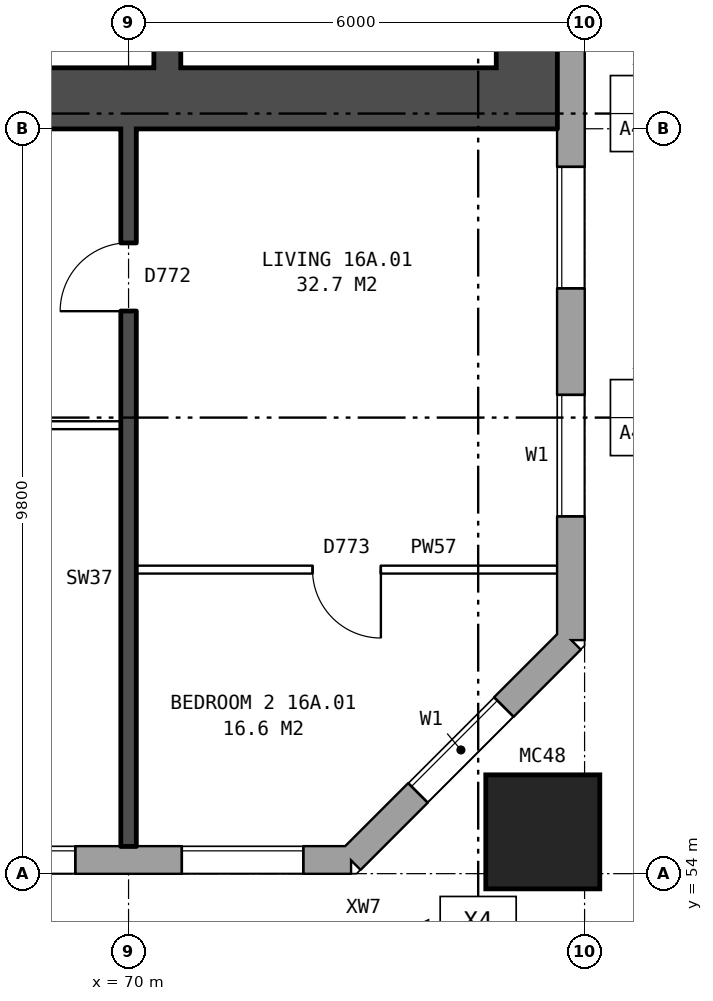
"""IFC4 building model, lengths in metres.
Left out: names, types, materials, properties, quantities, classifications, styles, units other than length and angle.
Written with IfcOpenShell. Run it as: python <this file> out.ifc"""

import sys

from ifc_helpers import new_model, si_unit, direction, frame, frame_2d, origin, origin_2d, place, context, subcontext, project, spatial, rectangle, hollow_rectangle, extrude, element, fill, save


model = new_model("IFC4")
c1 = context("Model", 3, precision=1e-05, world=origin(), true_north=direction((0.0, 1.0)))
c2 = subcontext(c1, "Body", "Model", "MODEL_VIEW")
j1 = project(units=[si_unit("LENGTHUNIT", "METRE"), si_unit("PLANEANGLEUNIT", "RADIAN")], contexts=[c1])
p1 = place(None, origin())
s1 = spatial("IfcSite", under=j1, at=p1, CompositionType="ELEMENT")
p2 = place(p1, origin())
s2 = spatial("IfcBuilding", under=s1, at=p2, CompositionType="ELEMENT")
p3 = place(p2, frame((0.0, 0.0, 59.8)))
s3 = spatial("IfcBuildingStorey", under=s2, at=p3, CompositionType="ELEMENT", Elevation=59.8)
p4 = place(p3, frame((75.45, 54.55, 0.0), z_axis=(0.0, 0.0, 1.0), x_axis=(1.0, 0.0, 0.0)))
e1 = element("IfcColumn", 1, at=p4, inside=s3, PredefinedType="COLUMN", context=c2, shape_type="SweptSolid", body=[
    extrude(hollow_rectangle(XDim=1.5, YDim=1.5, WallThickness=0.08, at=origin_2d()), origin(), (0.0, 0.0, 1.0), 3.1),
])
p5 = place(p3, frame((24.575, 54.18, 0.0), z_axis=(0.0, 0.0, 1.0), x_axis=(1.0, 0.0, 0.0)))
e2 = element("IfcWall", 2, at=p5, inside=s3, PredefinedType="STANDARD", context=c2, shape_type="SweptSolid", body=[
    extrude(rectangle(XDim=48.351, YDim=0.36, at=frame_2d((24.175, 0.0))), origin(), (0.0, 0.0, 1.0), 2.85),
])
p6 = place(p5, frame((1.125, 0.0, 0.8)))
e3 = element("IfcOpeningElement", 3, at=p6, cuts=e2, PredefinedType="OPENING", context=c2, shape_type="SweptSolid", body=[
    extrude(rectangle(XDim=1.6, YDim=1.8, at=frame_2d((0.8, 0.9))), frame((0.0, 0.19, 0.0), z_axis=(0.0, -1.0, 0.0), x_axis=(1.0, 0.0, 0.0)), (0.0, 0.0, 1.0), 0.38),
])
p7 = place(p5, frame((4.125, 0.0, 0.8)))
e4 = element("IfcOpeningElement", 4, at=p7, cuts=e2, PredefinedType="OPENING", context=c2, shape_type="SweptSolid", body=[
    extrude(rectangle(XDim=1.6, YDim=1.8, at=frame_2d((0.8, 0.9))), frame((0.0, 0.19, 0.0), z_axis=(0.0, -1.0, 0.0), x_axis=(1.0, 0.0, 0.0)), (0.0, 0.0, 1.0), 0.38),
])
p8 = place(p5, frame((7.125, 0.0, 0.8)))
e5 = element("IfcOpeningElement", 5, at=p8, cuts=e2, PredefinedType="OPENING", context=c2, shape_type="SweptSolid", body=[
    extrude(rectangle(XDim=1.6, YDim=1.8, at=frame_2d((0.8, 0.9))), frame((0.0, 0.19, 0.0), z_axis=(0.0, -1.0, 0.0), x_axis=(1.0, 0.0, 0.0)), (0.0, 0.0, 1.0), 0.38),
])
p9 = place(p5, frame((10.125, 0.0, 0.8)))
e6 = element("IfcOpeningElement", 6, at=p9, cuts=e2, PredefinedType="OPENING", context=c2, shape_type="SweptSolid", body=[
    extrude(rectangle(XDim=1.6, YDim=1.8, at=frame_2d((0.8, 0.9))), frame((0.0, 0.19, 0.0), z_axis=(0.0, -1.0, 0.0), x_axis=(1.0, 0.0, 0.0)), (0.0, 0.0, 1.0), 0.38),
])
p10 = place(p5, frame((13.125, 0.0, 0.8)))
e7 = element("IfcOpeningElement", 7, at=p10, cuts=e2, PredefinedType="OPENING", context=c2, shape_type="SweptSolid", body=[
    extrude(rectangle(XDim=1.6, YDim=1.8, at=frame_2d((0.8, 0.9))), frame((0.0, 0.19, 0.0), z_axis=(0.0, -1.0, 0.0), x_axis=(1.0, 0.0, 0.0)), (0.0, 0.0, 1.0), 0.38),
])
p11 = place(p5, frame((16.125, 0.0, 0.8)))
e8 = element("IfcOpeningElement", 8, at=p11, cuts=e2, PredefinedType="OPENING", context=c2, shape_type="SweptSolid", body=[
    extrude(rectangle(XDim=1.6, YDim=1.8, at=frame_2d((0.8, 0.9))), frame((0.0, 0.19, 0.0), z_axis=(0.0, -1.0, 0.0), x_axis=(1.0, 0.0, 0.0)), (0.0, 0.0, 1.0), 0.38),
])
p12 = place(p5, frame((19.125, 0.0, 0.8)))
e9 = element("IfcOpeningElement", 9, at=p12, cuts=e2, PredefinedType="OPENING", context=c2, shape_type="SweptSolid", body=[
    extrude(rectangle(XDim=1.6, YDim=1.8, at=frame_2d((0.8, 0.9))), frame((0.0, 0.19, 0.0), z_axis=(0.0, -1.0, 0.0), x_axis=(1.0, 0.0, 0.0)), (0.0, 0.0, 1.0), 0.38),
])
p13 = place(p5, frame((22.425, 0.0, 0.15)))
e10 = element("IfcOpeningElement", 10, at=p13, cuts=e2, PredefinedType="OPENING", context=c2, shape_type="SweptSolid", body=[
    extrude(rectangle(XDim=0.6, YDim=0.9, at=frame_2d((0.3, 0.45))), frame((0.0, 0.19, 0.0), z_axis=(0.0, -1.0, 0.0), x_axis=(1.0, 0.0, 0.0)), (0.0, 0.0, 1.0), 0.38),
])
p14 = place(p5, frame((24.575, 0.0, 0.25)))
e11 = element("IfcOpeningElement", 11, at=p14, cuts=e2, PredefinedType="OPENING", context=c2, shape_type="SweptSolid", body=[
    extrude(rectangle(XDim=1.2, YDim=0.9, at=frame_2d((0.6, 0.45))), frame((0.0, 0.19, 0.0), z_axis=(0.0, -1.0, 0.0), x_axis=(1.0, 0.0, 0.0)), (0.0, 0.0, 1.0), 0.38),
])
p15 = place(p5, frame((28.125, 0.0, 0.8)))
e12 = element("IfcOpeningElement", 12, at=p15, cuts=e2, PredefinedType="OPENING", context=c2, shape_type="SweptSolid", body=[
    extrude(rectangle(XDim=1.6, YDim=1.8, at=frame_2d((0.8, 0.9))), frame((0.0, 0.19, 0.0), z_axis=(0.0, -1.0, 0.0), x_axis=(1.0, 0.0, 0.0)), (0.0, 0.0, 1.0), 0.38),
])
p16 = place(p5, frame((31.125, 0.0, 0.8)))
e13 = element("IfcOpeningElement", 13, at=p16, cuts=e2, PredefinedType="OPENING", context=c2, shape_type="SweptSolid", body=[
    extrude(rectangle(XDim=1.6, YDim=1.8, at=frame_2d((0.8, 0.9))), frame((0.0, 0.19, 0.0), z_axis=(0.0, -1.0, 0.0), x_axis=(1.0, 0.0, 0.0)), (0.0, 0.0, 1.0), 0.38),
])
p17 = place(p5, frame((34.125, 0.0, 0.8)))
e14 = element("IfcOpeningElement", 14, at=p17, cuts=e2, PredefinedType="OPENING", context=c2, shape_type="SweptSolid", body=[
    extrude(rectangle(XDim=1.6, YDim=1.8, at=frame_2d((0.8, 0.9))), frame((0.0, 0.19, 0.0), z_axis=(0.0, -1.0, 0.0), x_axis=(1.0, 0.0, 0.0)), (0.0, 0.0, 1.0), 0.38),
])
p18 = place(p5, frame((37.125, 0.0, 0.8)))
e15 = element("IfcOpeningElement", 15, at=p18, cuts=e2, PredefinedType="OPENING", context=c2, shape_type="SweptSolid", body=[
    extrude(rectangle(XDim=1.6, YDim=1.8, at=frame_2d((0.8, 0.9))), frame((0.0, 0.19, 0.0), z_axis=(0.0, -1.0, 0.0), x_axis=(1.0, 0.0, 0.0)), (0.0, 0.0, 1.0), 0.38),
])
p19 = place(p5, frame((40.125, 0.0, 0.8)))
e16 = element("IfcOpeningElement", 16, at=p19, cuts=e2, PredefinedType="OPENING", context=c2, shape_type="SweptSolid", body=[
    extrude(rectangle(XDim=1.6, YDim=1.8, at=frame_2d((0.8, 0.9))), frame((0.0, 0.19, 0.0), z_axis=(0.0, -1.0, 0.0), x_axis=(1.0, 0.0, 0.0)), (0.0, 0.0, 1.0), 0.38),
])
p20 = place(p5, frame((43.125, 0.0, 0.8)))
e17 = element("IfcOpeningElement", 17, at=p20, cuts=e2, PredefinedType="OPENING", context=c2, shape_type="SweptSolid", body=[
    extrude(rectangle(XDim=1.6, YDim=1.8, at=frame_2d((0.8, 0.9))), frame((0.0, 0.19, 0.0), z_axis=(0.0, -1.0, 0.0), x_axis=(1.0, 0.0, 0.0)), (0.0, 0.0, 1.0), 0.38),
])
p21 = place(p5, frame((46.125, 0.0, 0.8)))
e18 = element("IfcOpeningElement", 18, at=p21, cuts=e2, PredefinedType="OPENING", context=c2, shape_type="SweptSolid", body=[
    extrude(rectangle(XDim=1.6, YDim=1.8, at=frame_2d((0.8, 0.9))), frame((0.0, 0.19, 0.0), z_axis=(0.0, -1.0, 0.0), x_axis=(1.0, 0.0, 0.0)), (0.0, 0.0, 1.0), 0.38),
])
p22 = place(p5, frame((23.325, 0.0, 0.15)))
e19 = element("IfcOpeningElement", 19, at=p22, cuts=e2, PredefinedType="OPENING", context=c2, shape_type="SweptSolid", body=[
    extrude(rectangle(XDim=0.8, YDim=1.5, at=frame_2d((0.4, 0.75))), frame((0.0, 0.19, 0.0), z_axis=(0.0, -1.0, 0.0), x_axis=(1.0, 0.0, 0.0)), (0.0, 0.0, 1.0), 0.38),
])
p23 = place(p5, frame((26.425, 0.0, 1.65)))
e20 = element("IfcOpeningElement", 20, at=p23, cuts=e2, PredefinedType="OPENING", context=c2, shape_type="SweptSolid", body=[
    extrude(rectangle(XDim=0.8, YDim=0.9, at=frame_2d((0.4, 0.45))), frame((0.0, 0.19, 0.0), z_axis=(0.0, -1.0, 0.0), x_axis=(1.0, 0.0, 0.0)), (0.0, 0.0, 1.0), 0.38),
])
p24 = place(p3, frame((72.925, 54.18, 0.0), z_axis=(0.0, 0.0, 1.0), x_axis=(0.707106781187, 0.707106781187, 0.0)))
e21 = element("IfcWall", 21, at=p24, inside=s3, PredefinedType="STANDARD", context=c2, shape_type="SweptSolid", body=[
    extrude(rectangle(XDim=4.094, YDim=0.36, at=frame_2d((2.047, 0.0))), origin(), (0.0, 0.0, 1.0), 2.85),
])
p25 = place(p24, frame((1.247, 0.0, 0.8)))
e22 = element("IfcOpeningElement", 22, at=p25, cuts=e21, PredefinedType="OPENING", context=c2, shape_type="SweptSolid", body=[
    extrude(rectangle(XDim=1.6, YDim=1.8, at=frame_2d((0.8, 0.9))), frame((0.0, 0.19, 0.0), z_axis=(0.0, -1.0, 0.0), x_axis=(1.0, 0.0, 0.0)), (0.0, 0.0, 1.0), 0.38),
])
p26 = place(p3, frame((75.82, 57.075, 0.0), z_axis=(0.0, 0.0, 1.0), x_axis=(0.0, 1.0, 0.0)))
e23 = element("IfcWall", 23, at=p26, inside=s3, PredefinedType="STANDARD", context=c2, shape_type="SweptSolid", body=[
    extrude(rectangle(XDim=25.851, YDim=0.36, at=frame_2d((12.925, 0.0))), origin(), (0.0, 0.0, 1.0), 2.85),
])
p27 = place(p26, frame((1.625, 0.0, 0.8)))
e24 = element("IfcOpeningElement", 24, at=p27, cuts=e23, PredefinedType="OPENING", context=c2, shape_type="SweptSolid", body=[
    extrude(rectangle(XDim=1.6, YDim=1.8, at=frame_2d((0.8, 0.9))), frame((0.0, 0.19, 0.0), z_axis=(0.0, -1.0, 0.0), x_axis=(1.0, 0.0, 0.0)), (0.0, 0.0, 1.0), 0.38),
])
p28 = place(p26, frame((4.625, 0.0, 0.8)))
e25 = element("IfcOpeningElement", 25, at=p28, cuts=e23, PredefinedType="OPENING", context=c2, shape_type="SweptSolid", body=[
    extrude(rectangle(XDim=1.6, YDim=1.8, at=frame_2d((0.8, 0.9))), frame((0.0, 0.19, 0.0), z_axis=(0.0, -1.0, 0.0), x_axis=(1.0, 0.0, 0.0)), (0.0, 0.0, 1.0), 0.38),
])
p29 = place(p26, frame((19.625, 0.0, 0.8)))
e26 = element("IfcOpeningElement", 26, at=p29, cuts=e23, PredefinedType="OPENING", context=c2, shape_type="SweptSolid", body=[
    extrude(rectangle(XDim=1.6, YDim=1.8, at=frame_2d((0.8, 0.9))), frame((0.0, 0.19, 0.0), z_axis=(0.0, -1.0, 0.0), x_axis=(1.0, 0.0, 0.0)), (0.0, 0.0, 1.0), 0.38),
])
p30 = place(p26, frame((22.625, 0.0, 0.8)))
e27 = element("IfcOpeningElement", 27, at=p30, cuts=e23, PredefinedType="OPENING", context=c2, shape_type="SweptSolid", body=[
    extrude(rectangle(XDim=1.6, YDim=1.8, at=frame_2d((0.8, 0.9))), frame((0.0, 0.19, 0.0), z_axis=(0.0, -1.0, 0.0), x_axis=(1.0, 0.0, 0.0)), (0.0, 0.0, 1.0), 0.38),
])
p31 = place(p3, frame((75.24, 64.6, 0.0), z_axis=(0.0, 0.0, 1.0), x_axis=(0.0, 1.0, 0.0)))
e28 = element("IfcWall", 28, at=p31, inside=s3, PredefinedType="SHEAR", context=c2, shape_type="SweptSolid", body=[
    extrude(rectangle(XDim=10.8, YDim=0.8, at=frame_2d((5.4, 0.0))), origin(), (0.0, 0.0, 1.0), 2.85),
])
p32 = place(p3, frame((66.64, 64.2, 0.0), z_axis=(0.0, 0.0, 1.0), x_axis=(1.0, 0.0, 0.0)))
e29 = element("IfcWall", 29, at=p32, inside=s3, PredefinedType="SHEAR", context=c2, shape_type="SweptSolid", body=[
    extrude(rectangle(XDim=9.0, YDim=0.8, at=frame_2d((4.5, 0.0))), origin(), (0.0, 0.0, 1.0), 2.85),
])
p33 = place(p3, frame((70.51, 64.6, 0.0), z_axis=(0.0, 0.0, 1.0), x_axis=(0.0, 1.0, 0.0)))
e30 = element("IfcWall", 30, at=p33, inside=s3, PredefinedType="SHEAR", context=c2, shape_type="SweptSolid", body=[
    extrude(rectangle(XDim=2.075, YDim=0.35, at=frame_2d((1.038, 0.0))), origin(), (0.0, 0.0, 1.0), 2.85),
])
p34 = place(p3, frame((70.1, 58.0, 0.0), z_axis=(0.0, 0.0, 1.0), x_axis=(1.0, 0.0, 0.0)))
e31 = element("IfcWall", 31, at=p34, inside=s3, PredefinedType="PARTITIONING", context=c2, shape_type="SweptSolid", body=[
    extrude(rectangle(XDim=5.54, YDim=0.1, at=frame_2d((2.77, 0.0))), origin(), (0.0, 0.0, 1.0), 2.85),
])
p35 = place(p34, frame((2.32, 0.0, 0.0)))
e32 = element("IfcOpeningElement", 32, at=p35, cuts=e31, PredefinedType="OPENING", context=c2, shape_type="SweptSolid", body=[
    extrude(rectangle(XDim=0.9, YDim=2.1, at=frame_2d((0.45, 1.05))), frame((0.0, 0.06, 0.0), z_axis=(0.0, -1.0, 0.0), x_axis=(1.0, 0.0, 0.0)), (0.0, 0.0, 1.0), 0.12),
])
p36 = place(p3, frame((64.1, 59.9, 0.0), z_axis=(0.0, 0.0, 1.0), x_axis=(1.0, 0.0, 0.0)))
e33 = element("IfcWall", 33, at=p36, inside=s3, PredefinedType="PARTITIONING", context=c2, shape_type="SweptSolid", body=[
    extrude(rectangle(XDim=5.8, YDim=0.1, at=frame_2d((2.9, 0.0))), origin(), (0.0, 0.0, 1.0), 2.85),
])
p37 = place(p36, frame((3.6, 0.0, 0.0)))
e34 = element("IfcOpeningElement", 34, at=p37, cuts=e33, PredefinedType="OPENING", context=c2, shape_type="SweptSolid", body=[
    extrude(rectangle(XDim=0.9, YDim=2.1, at=frame_2d((0.45, 1.05))), frame((0.0, 0.06, 0.0), z_axis=(0.0, -1.0, 0.0), x_axis=(1.0, 0.0, 0.0)), (0.0, 0.0, 1.0), 0.12),
])
p38 = place(p36, frame((0.7, 0.0, 0.0)))
e35 = element("IfcOpeningElement", 35, at=p38, cuts=e33, PredefinedType="OPENING", context=c2, shape_type="SweptSolid", body=[
    extrude(rectangle(XDim=0.9, YDim=2.1, at=frame_2d((0.45, 1.05))), frame((0.0, 0.06, 0.0), z_axis=(0.0, -1.0, 0.0), x_axis=(1.0, 0.0, 0.0)), (0.0, 0.0, 1.0), 0.12),
])
p39 = place(p3, frame((70.0, 54.36, 0.0), z_axis=(0.0, 0.0, 1.0), x_axis=(0.0, 1.0, 0.0)))
e36 = element("IfcWall", 36, at=p39, inside=s3, PredefinedType="SOLIDWALL", context=c2, shape_type="SweptSolid", body=[
    extrude(rectangle(XDim=9.44, YDim=0.2, at=frame_2d((4.72, 0.0))), origin(), (0.0, 0.0, 1.0), 2.85),
])
p40 = place(p39, frame((7.04, 0.0, 0.0)))
e37 = element("IfcOpeningElement", 37, at=p40, cuts=e36, PredefinedType="OPENING", context=c2, shape_type="SweptSolid", body=[
    extrude(rectangle(XDim=0.9, YDim=2.1, at=frame_2d((0.45, 1.05))), frame((0.0, 0.11, 0.0), z_axis=(0.0, -1.0, 0.0), x_axis=(1.0, 0.0, 0.0)), (0.0, 0.0, 1.0), 0.22),
])
p41 = place(p20, origin())
e38 = element("IfcWindow", 38, at=p41, inside=s3, PartitioningType="SINGLE_PANEL", PredefinedType="WINDOW", context=c2, shape_type="SweptSolid", body=[
    extrude(rectangle(XDim=1.6, YDim=1.8, at=frame_2d((0.8, 0.9))), frame((0.0, 0.15, 0.0), z_axis=(0.0, -1.0, 0.0), x_axis=(1.0, 0.0, 0.0)), (0.0, 0.0, 1.0), 0.06),
])
fill(e17, e38)
p42 = place(p21, origin())
e39 = element("IfcWindow", 39, at=p42, inside=s3, PartitioningType="SINGLE_PANEL", PredefinedType="WINDOW", context=c2, shape_type="SweptSolid", body=[
    extrude(rectangle(XDim=1.6, YDim=1.8, at=frame_2d((0.8, 0.9))), frame((0.0, 0.15, 0.0), z_axis=(0.0, -1.0, 0.0), x_axis=(1.0, 0.0, 0.0)), (0.0, 0.0, 1.0), 0.06),
])
fill(e18, e39)
p43 = place(p25, origin())
e40 = element("IfcWindow", 40, at=p43, inside=s3, PartitioningType="SINGLE_PANEL", PredefinedType="WINDOW", context=c2, shape_type="SweptSolid", body=[
    extrude(rectangle(XDim=1.6, YDim=1.8, at=frame_2d((0.8, 0.9))), frame((0.0, 0.15, 0.0), z_axis=(0.0, -1.0, 0.0), x_axis=(1.0, 0.0, 0.0)), (0.0, 0.0, 1.0), 0.06),
])
fill(e22, e40)
p44 = place(p27, origin())
e41 = element("IfcWindow", 41, at=p44, inside=s3, PartitioningType="SINGLE_PANEL", PredefinedType="WINDOW", context=c2, shape_type="SweptSolid", body=[
    extrude(rectangle(XDim=1.6, YDim=1.8, at=frame_2d((0.8, 0.9))), frame((0.0, 0.15, 0.0), z_axis=(0.0, -1.0, 0.0), x_axis=(1.0, 0.0, 0.0)), (0.0, 0.0, 1.0), 0.06),
])
fill(e24, e41)
p45 = place(p28, origin())
e42 = element("IfcWindow", 42, at=p45, inside=s3, PartitioningType="SINGLE_PANEL", PredefinedType="WINDOW", context=c2, shape_type="SweptSolid", body=[
    extrude(rectangle(XDim=1.6, YDim=1.8, at=frame_2d((0.8, 0.9))), frame((0.0, 0.15, 0.0), z_axis=(0.0, -1.0, 0.0), x_axis=(1.0, 0.0, 0.0)), (0.0, 0.0, 1.0), 0.06),
])
fill(e25, e42)
p46 = place(p35, frame((0.9, 0.0, 0.0), z_axis=(0.0, 0.0, 1.0), x_axis=(-1.0, 0.0, 0.0)))
e43 = element("IfcDoor", 43, at=p46, inside=s3, OperationType="SINGLE_SWING_LEFT", PredefinedType="DOOR", context=c2, shape_type="SweptSolid", body=[
    extrude(rectangle(XDim=0.9, YDim=2.1, at=frame_2d((0.45, 1.05))), frame((0.0, 0.025, 0.0), z_axis=(0.0, -1.0, 0.0), x_axis=(1.0, 0.0, 0.0)), (0.0, 0.0, 1.0), 0.05),
])
fill(e32, e43)
p47 = place(p40, origin())
e44 = element("IfcDoor", 44, at=p47, inside=s3, OperationType="SINGLE_SWING_LEFT", PredefinedType="DOOR", context=c2, shape_type="SweptSolid", body=[
    extrude(rectangle(XDim=0.9, YDim=2.1, at=frame_2d((0.45, 1.05))), frame((0.0, 0.025, 0.0), z_axis=(0.0, -1.0, 0.0), x_axis=(1.0, 0.0, 0.0)), (0.0, 0.0, 1.0), 0.05),
])
fill(e37, e44)
save(model, sys.argv[1])
